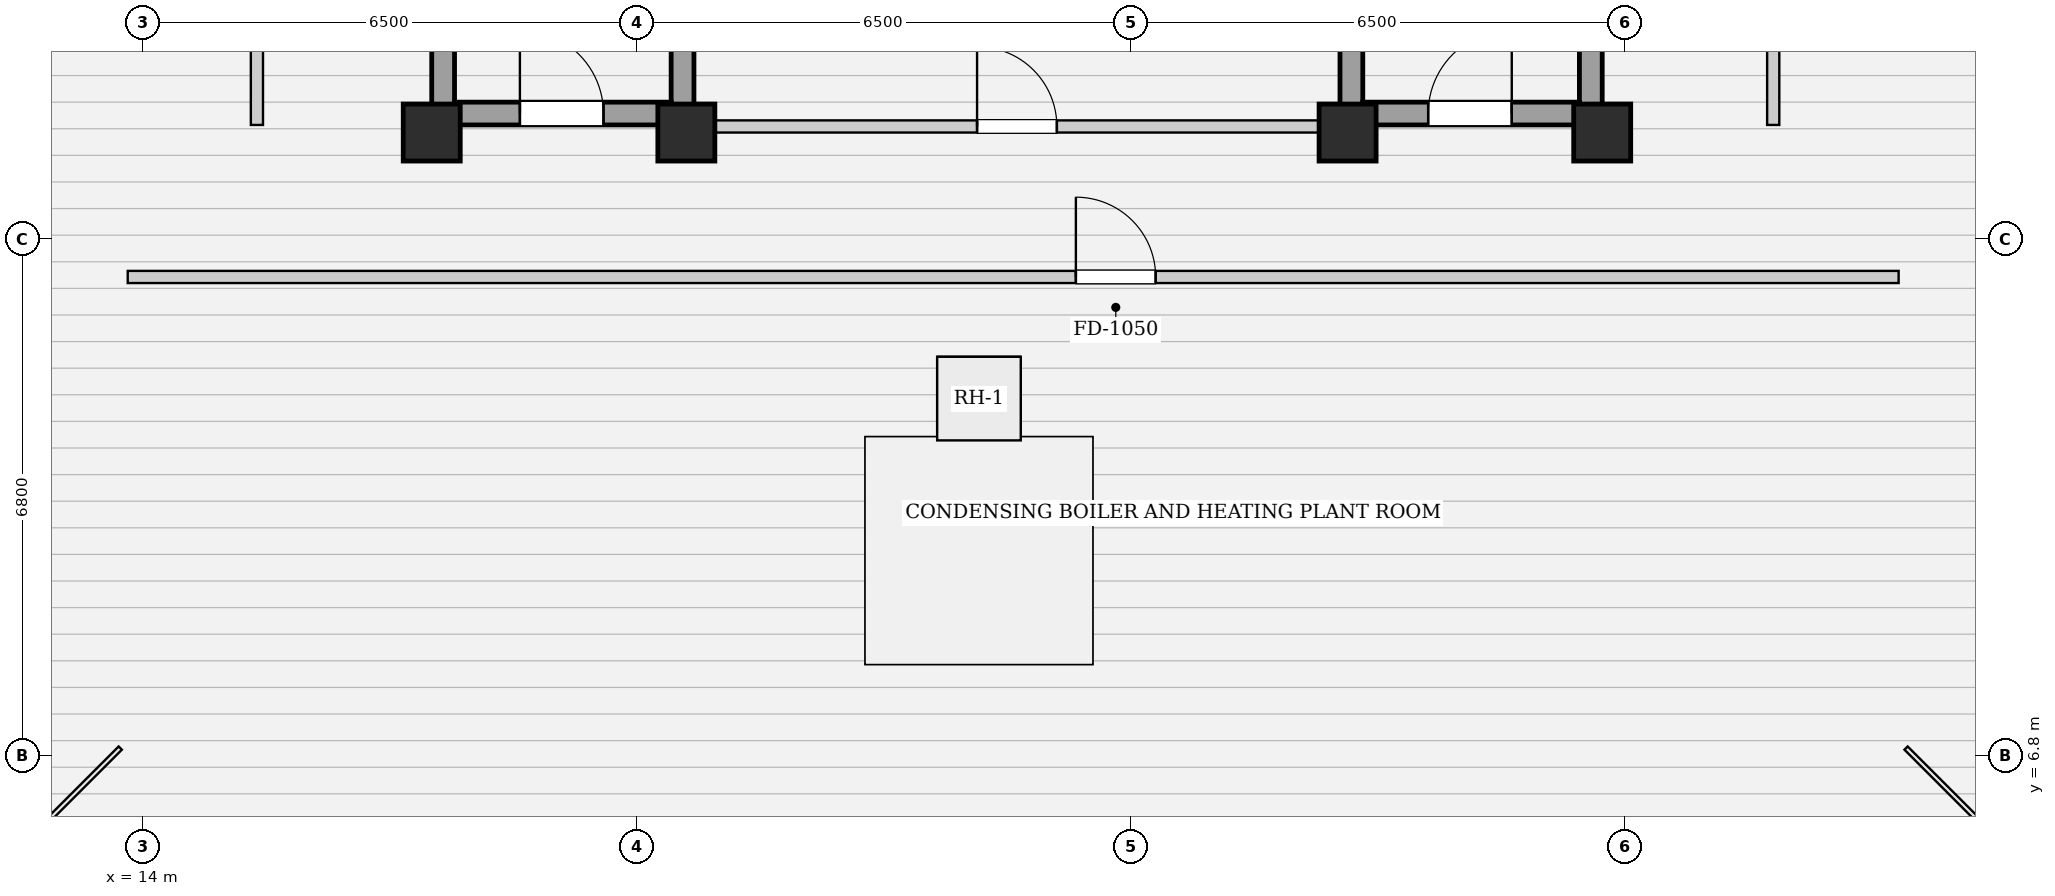
"""IFC4 building model, lengths in metres.
Left out: names, types, materials, properties, quantities, classifications, styles, units other than length and angle.
Written with IfcOpenShell. Run it as: python <this file> out.ifc"""

import sys

from ifc_helpers import new_model, si_unit, direction, frame, frame_2d, origin, origin_2d, place, context, subcontext, project, spatial, rectangle, extrude, element, fill, save


model = new_model("IFC4")
c1 = context("Model", 3, precision=1e-05, world=origin(), true_north=direction((0.0, 1.0)))
c2 = subcontext(c1, "Body", "Model", "MODEL_VIEW")
j1 = project(units=[si_unit("LENGTHUNIT", "METRE"), si_unit("PLANEANGLEUNIT", "RADIAN")], contexts=[c1])
p1 = place(None, origin())
s1 = spatial("IfcSite", under=j1, at=p1, CompositionType="ELEMENT")
p2 = place(p1, origin())
s2 = spatial("IfcBuilding", under=s1, at=p2, CompositionType="ELEMENT")
p3 = place(p2, frame((0.0, 0.0, 261.5)))
s3 = spatial("IfcBuildingStorey", under=s2, at=p3, CompositionType="ELEMENT", Elevation=261.5)
for number, where, z_axis, x_axis in (
    (1, (17.8, 15.0, 0.0), (0.0, 0.0, 1.0), (1.0, 0.0, 0.0)),
    (2, (21.15, 15.0, 0.0), (0.0, 0.0, 1.0), (1.0, 0.0, 0.0)),
    (3, (29.85, 15.0, 0.0), (0.0, 0.0, 1.0), (1.0, 0.0, 0.0)),
    (4, (33.2, 15.0, 0.0), (0.0, 0.0, 1.0), (1.0, 0.0, 0.0)),
):
    element("IfcColumn", number, at=place(p3, frame(where, z_axis=z_axis, x_axis=x_axis)), inside=s3, PredefinedType="COLUMN", context=c2, shape_type="SweptSolid", body=[
        extrude(rectangle(XDim=0.75, YDim=0.75, at=origin_2d()), origin(), (0.0, 0.0, 1.0), 12.95),
    ])
for number, where, z_axis, x_axis in (
    (5, (17.95, 15.1, 0.0), (0.0, 0.0, 1.0), (0.0, 1.0, 0.0)),
    (6, (21.1, 15.1, 0.0), (0.0, 0.0, 1.0), (0.0, 1.0, 0.0)),
):
    element("IfcWall", number, at=place(p3, frame(where, z_axis=z_axis, x_axis=x_axis)), inside=s3, PredefinedType="SHEAR", context=c2, shape_type="SweptSolid", body=[
        extrude(rectangle(XDim=9.0, YDim=0.3, at=frame_2d((4.5, 0.0))), origin(), (0.0, 0.0, 1.0), 13.2),
    ])
p4 = place(p3, frame((18.1, 15.25, 0.0), z_axis=(0.0, 0.0, 1.0), x_axis=(1.0, 0.0, 0.0)))
e7 = element("IfcWall", 7, at=p4, inside=s3, PredefinedType="SHEAR", context=c2, shape_type="SweptSolid", body=[
    extrude(rectangle(XDim=2.85, YDim=0.3, at=frame_2d((1.425, 0.0))), origin(), (0.0, 0.0, 1.0), 13.2),
])
p5 = place(p4, frame((0.86, 0.0, 0.0)))
e8 = element("IfcOpeningElement", 8, at=p5, cuts=e7, PredefinedType="OPENING", context=c2, shape_type="SweptSolid", body=[
    extrude(rectangle(XDim=1.1, YDim=2.05, at=frame_2d((0.55, 1.025))), frame((0.0, 0.16, 0.0), z_axis=(0.0, -1.0, 0.0), x_axis=(1.0, 0.0, 0.0)), (0.0, 0.0, 1.0), 0.32),
])
for number, where, z_axis, x_axis in (
    (9, (29.9, 15.1, 0.0), (0.0, 0.0, 1.0), (0.0, 1.0, 0.0)),
    (10, (33.05, 15.1, 0.0), (0.0, 0.0, 1.0), (0.0, 1.0, 0.0)),
):
    element("IfcWall", number, at=place(p3, frame(where, z_axis=z_axis, x_axis=x_axis)), inside=s3, PredefinedType="SHEAR", context=c2, shape_type="SweptSolid", body=[
        extrude(rectangle(XDim=9.0, YDim=0.3, at=frame_2d((4.5, 0.0))), origin(), (0.0, 0.0, 1.0), 13.2),
    ])
p6 = place(p3, frame((30.05, 15.25, 0.0), z_axis=(0.0, 0.0, 1.0), x_axis=(1.0, 0.0, 0.0)))
e11 = element("IfcWall", 11, at=p6, inside=s3, PredefinedType="SHEAR", context=c2, shape_type="SweptSolid", body=[
    extrude(rectangle(XDim=2.85, YDim=0.3, at=frame_2d((1.425, 0.0))), origin(), (0.0, 0.0, 1.0), 13.2),
])
p7 = place(p6, frame((0.86, 0.0, 0.0)))
e12 = element("IfcOpeningElement", 12, at=p7, cuts=e11, PredefinedType="OPENING", context=c2, shape_type="SweptSolid", body=[
    extrude(rectangle(XDim=1.1, YDim=2.05, at=frame_2d((0.55, 1.025))), frame((0.0, 0.16, 0.0), z_axis=(0.0, -1.0, 0.0), x_axis=(1.0, 0.0, 0.0)), (0.0, 0.0, 1.0), 0.32),
])
p8 = place(p3, frame((21.25, 15.08, 0.0), z_axis=(0.0, 0.0, 1.0), x_axis=(1.0, 0.0, 0.0)))
e13 = element("IfcWall", 13, at=p8, inside=s3, PredefinedType="PARTITIONING", context=c2, shape_type="SweptSolid", body=[
    extrude(rectangle(XDim=8.5, YDim=0.16, at=frame_2d((4.25, 0.0))), origin(), (0.0, 0.0, 1.0), 12.319),
])
p9 = place(p8, frame((3.725, 0.0, 0.0)))
e14 = element("IfcOpeningElement", 14, at=p9, cuts=e13, PredefinedType="OPENING", context=c2, shape_type="SweptSolid", body=[
    extrude(rectangle(XDim=1.05, YDim=2.05, at=frame_2d((0.525, 1.025))), frame((0.0, 0.09, 0.0), z_axis=(0.0, -1.0, 0.0), x_axis=(1.0, 0.0, 0.0)), (0.0, 0.0, 1.0), 0.18),
])
p10 = place(p3, frame((13.8, 13.1, 0.0), z_axis=(0.0, 0.0, 1.0), x_axis=(1.0, 0.0, 0.0)))
e15 = element("IfcWall", 15, at=p10, inside=s3, PredefinedType="PARTITIONING", context=c2, shape_type="SweptSolid", body=[
    extrude(rectangle(XDim=23.3, YDim=0.16, at=frame_2d((11.65, 0.0))), origin(), (0.0, 0.0, 1.0), 13.2),
])
p11 = place(p10, frame((12.475, 0.0, 0.0)))
e16 = element("IfcOpeningElement", 16, at=p11, cuts=e15, PredefinedType="OPENING", context=c2, shape_type="SweptSolid", body=[
    extrude(rectangle(XDim=1.05, YDim=2.05, at=frame_2d((0.525, 1.025))), frame((0.0, 0.09, 0.0), z_axis=(0.0, -1.0, 0.0), x_axis=(1.0, 0.0, 0.0)), (0.0, 0.0, 1.0), 0.18),
])
p12 = place(p3, frame((15.5, 15.1, 0.0), z_axis=(0.0, 0.0, 1.0), x_axis=(0.0, 1.0, 0.0)))
e17 = element("IfcWall", 17, at=p12, inside=s3, PredefinedType="PARTITIONING", context=c2, shape_type="SweptSolid", body=[
    extrude(rectangle(XDim=13.8, YDim=0.16, at=frame_2d((6.9, 0.0))), origin(), (0.0, 0.0, 1.0), 13.2),
])
p13 = place(p12, frame((6.475, 0.0, 0.0)))
e18 = element("IfcOpeningElement", 18, at=p13, cuts=e17, PredefinedType="OPENING", context=c2, shape_type="SweptSolid", body=[
    extrude(rectangle(XDim=1.05, YDim=2.05, at=frame_2d((0.525, 1.025))), frame((0.0, 0.09, 0.0), z_axis=(0.0, -1.0, 0.0), x_axis=(1.0, 0.0, 0.0)), (0.0, 0.0, 1.0), 0.18),
])
p14 = place(p3, frame((35.45, 15.1, 0.0), z_axis=(0.0, 0.0, 1.0), x_axis=(0.0, 1.0, 0.0)))
e19 = element("IfcWall", 19, at=p14, inside=s3, PredefinedType="PARTITIONING", context=c2, shape_type="SweptSolid", body=[
    extrude(rectangle(XDim=13.8, YDim=0.16, at=frame_2d((6.9, 0.0))), origin(), (0.0, 0.0, 1.0), 13.2),
])
p15 = place(p14, frame((6.475, 0.0, 0.0)))
e20 = element("IfcOpeningElement", 20, at=p15, cuts=e19, PredefinedType="OPENING", context=c2, shape_type="SweptSolid", body=[
    extrude(rectangle(XDim=1.05, YDim=2.05, at=frame_2d((0.525, 1.025))), frame((0.0, 0.09, 0.0), z_axis=(0.0, -1.0, 0.0), x_axis=(1.0, 0.0, 0.0)), (0.0, 0.0, 1.0), 0.18),
])
p16 = place(p3, frame((0.0, 0.0, 12.95)))
p17 = place(p16, frame((25.0, 11.5, 0.25)))
e21 = element("IfcDoor", 21, at=p17, inside=s3, OperationType="SINGLE_SWING_LEFT", PredefinedType="TRAPDOOR", context=c2, shape_type="SweptSolid", body=[
    extrude(rectangle(XDim=1.1, YDim=1.1, at=origin_2d()), origin(), (0.0, 0.0, 1.0), 0.05),
])
p18 = place(p5, origin())
e22 = element("IfcDoor", 22, at=p18, inside=s3, OperationType="SINGLE_SWING_LEFT", PredefinedType="DOOR", context=c2, shape_type="SweptSolid", body=[
    extrude(rectangle(XDim=1.1, YDim=2.05, at=frame_2d((0.55, 1.025))), frame((0.0, 0.025, 0.0), z_axis=(0.0, -1.0, 0.0), x_axis=(1.0, 0.0, 0.0)), (0.0, 0.0, 1.0), 0.05),
])
fill(e8, e22)
p19 = place(p7, origin())
e23 = element("IfcDoor", 23, at=p19, inside=s3, OperationType="SINGLE_SWING_RIGHT", PredefinedType="DOOR", context=c2, shape_type="SweptSolid", body=[
    extrude(rectangle(XDim=1.1, YDim=2.05, at=frame_2d((0.55, 1.025))), frame((0.0, 0.025, 0.0), z_axis=(0.0, -1.0, 0.0), x_axis=(1.0, 0.0, 0.0)), (0.0, 0.0, 1.0), 0.05),
])
fill(e12, e23)
p20 = place(p9, origin())
e24 = element("IfcDoor", 24, at=p20, inside=s3, OperationType="SINGLE_SWING_LEFT", PredefinedType="DOOR", context=c2, shape_type="SweptSolid", body=[
    extrude(rectangle(XDim=1.05, YDim=2.05, at=frame_2d((0.525, 1.025))), frame((0.0, 0.025, 0.0), z_axis=(0.0, -1.0, 0.0), x_axis=(1.0, 0.0, 0.0)), (0.0, 0.0, 1.0), 0.05),
])
fill(e14, e24)
p21 = place(p11, origin())
e25 = element("IfcDoor", 25, at=p21, inside=s3, OperationType="SINGLE_SWING_LEFT", PredefinedType="DOOR", context=c2, shape_type="SweptSolid", body=[
    extrude(rectangle(XDim=1.05, YDim=2.05, at=frame_2d((0.525, 1.025))), frame((0.0, 0.025, 0.0), z_axis=(0.0, -1.0, 0.0), x_axis=(1.0, 0.0, 0.0)), (0.0, 0.0, 1.0), 0.05),
])
fill(e16, e25)
save(model, sys.argv[1])
